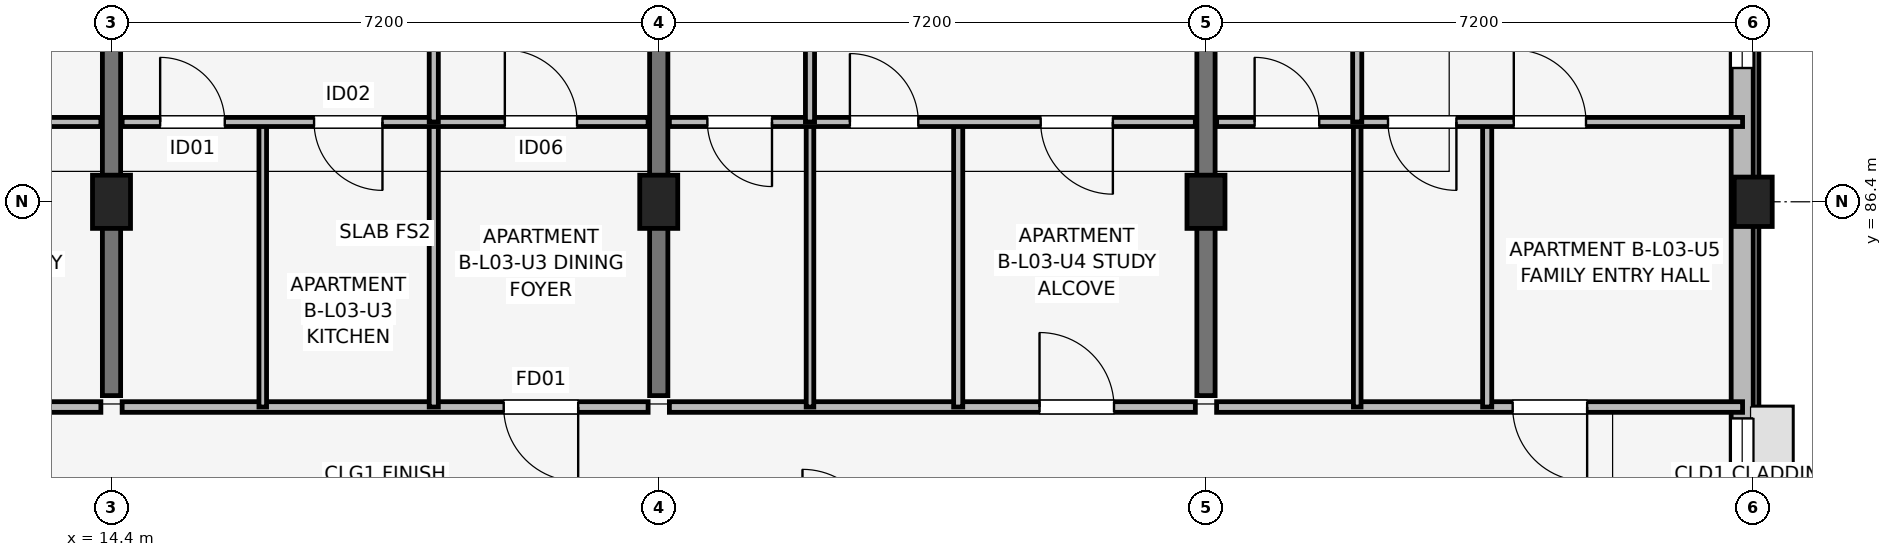
"""IFC4 building model, lengths in metres.
Left out: names, types, materials, properties, quantities, classifications, styles, units other than length and angle.
Written with IfcOpenShell. Run it as: python <this file> out.ifc"""

import sys

from ifc_helpers import new_model, si_unit, direction, frame, frame_2d, origin, origin_2d, place, context, subcontext, project, spatial, rectangle, extrude, element, fill, save


model = new_model("IFC4")
c1 = context("Model", 3, precision=1e-05, world=origin(), true_north=direction((0.0, 1.0)))
c2 = subcontext(c1, "Body", "Model", "MODEL_VIEW")
j1 = project(units=[si_unit("LENGTHUNIT", "METRE"), si_unit("PLANEANGLEUNIT", "RADIAN")], contexts=[c1])
p1 = place(None, origin())
s1 = spatial("IfcSite", under=j1, at=p1, CompositionType="ELEMENT")
p2 = place(p1, origin())
s2 = spatial("IfcBuilding", under=s1, at=p2, CompositionType="ELEMENT")
p3 = place(p2, frame((0.0, 0.0, 11.85)))
s3 = spatial("IfcBuildingStorey", under=s2, at=p3, CompositionType="ELEMENT", Elevation=11.85)
for number, where, z_axis, x_axis in (
    (1, (14.4, 86.4, 0.0), (0.0, 0.0, 1.0), (1.0, 0.0, 0.0)),
    (2, (21.6, 86.4, 0.0), (0.0, 0.0, 1.0), (1.0, 0.0, 0.0)),
    (3, (28.8, 86.4, 0.0), (0.0, 0.0, 1.0), (1.0, 0.0, 0.0)),
):
    element("IfcColumn", number, at=place(p3, frame(where, z_axis=z_axis, x_axis=x_axis)), inside=s3, PredefinedType="COLUMN", context=c2, shape_type="SweptSolid", body=[
        extrude(rectangle(XDim=0.5, YDim=0.7, at=origin_2d()), origin(), (0.0, 0.0, 1.0), 3.15),
    ])
p4 = place(p3, frame((36.0, 86.4, 0.0), z_axis=(0.0, 0.0, 1.0), x_axis=(1.0, 0.0, 0.0)))
e4 = element("IfcColumn", 4, at=p4, inside=s3, PredefinedType="COLUMN", context=c2, shape_type="SweptSolid", body=[
    extrude(rectangle(XDim=0.5, YDim=0.65, at=origin_2d()), origin(), (0.0, 0.0, 1.0), 3.15),
])
for number, where, z_axis, x_axis in (
    (5, (14.4, 83.85, 0.0), (0.0, 0.0, 1.0), (0.0, 1.0, 0.0)),
    (6, (21.6, 83.85, 0.0), (0.0, 0.0, 1.0), (0.0, 1.0, 0.0)),
    (7, (28.8, 83.85, 0.0), (0.0, 0.0, 1.0), (0.0, 1.0, 0.0)),
):
    element("IfcWall", number, at=place(p3, frame(where, z_axis=z_axis, x_axis=x_axis)), inside=s3, PredefinedType="SHEAR", context=c2, shape_type="SweptSolid", body=[
        extrude(rectangle(XDim=9.4, YDim=0.24, at=frame_2d((4.7, 0.0))), origin(), (0.0, 0.0, 1.0), 3.15),
    ])
p5 = place(p3, frame((35.855, 75.2, 0.0), z_axis=(0.0, 0.0, 1.0), x_axis=(0.0, 1.0, 0.0)))
e8 = element("IfcWall", 8, at=p5, inside=s3, PredefinedType="SOLIDWALL", context=c2, shape_type="SweptSolid", body=[
    extrude(rectangle(XDim=15.2, YDim=0.29, at=frame_2d((7.6, 0.0))), origin(), (0.0, 0.0, 1.0), 2.38),
])
p6 = place(p5, frame((6.85, 0.0, 1.05)))
e9 = element("IfcOpeningElement", 9, at=p6, cuts=e8, PredefinedType="OPENING", context=c2, shape_type="SweptSolid", body=[
    extrude(rectangle(XDim=1.5, YDim=1.15, at=frame_2d((0.75, 0.575))), frame((0.0, 0.155, 0.0), z_axis=(0.0, -1.0, 0.0), x_axis=(1.0, 0.0, 0.0)), (0.0, 0.0, 1.0), 0.31),
])
p7 = place(p5, frame((12.96, 0.0, 0.72)))
e10 = element("IfcOpeningElement", 10, at=p7, cuts=e8, PredefinedType="OPENING", context=c2, shape_type="SweptSolid", body=[
    extrude(rectangle(XDim=1.3, YDim=1.55, at=frame_2d((0.65, 0.775))), frame((0.0, 0.155, 0.0), z_axis=(0.0, -1.0, 0.0), x_axis=(1.0, 0.0, 0.0)), (0.0, 0.0, 1.0), 0.31),
])
p8 = place(p3, frame((7.34, 83.7, 0.0), z_axis=(0.0, 0.0, 1.0), x_axis=(1.0, 0.0, 0.0)))
e11 = element("IfcWall", 11, at=p8, inside=s3, PredefinedType="PARTITIONING", context=c2, shape_type="SweptSolid", body=[
    extrude(rectangle(XDim=6.92, YDim=0.14, at=frame_2d((3.46, 0.0))), origin(), (0.0, 0.0, 1.0), 2.38),
])
p9 = place(p8, frame((5.85, 0.0, 0.0), z_axis=(0.0, 0.0, 1.0), x_axis=(-1.0, 0.0, 0.0)))
e12 = element("IfcOpeningElement", 12, at=p9, cuts=e11, PredefinedType="OPENING", context=c2, shape_type="SweptSolid", body=[
    extrude(rectangle(XDim=0.98, YDim=2.1, at=frame_2d((0.49, 1.05))), frame((0.0, 0.08, 0.0), z_axis=(0.0, -1.0, 0.0), x_axis=(1.0, 0.0, 0.0)), (0.0, 0.0, 1.0), 0.16),
])
p10 = place(p3, frame((7.34, 87.45, 0.0), z_axis=(0.0, 0.0, 1.0), x_axis=(1.0, 0.0, 0.0)))
e13 = element("IfcWall", 13, at=p10, inside=s3, PredefinedType="PARTITIONING", context=c2, shape_type="SweptSolid", body=[
    extrude(rectangle(XDim=6.92, YDim=0.12, at=frame_2d((3.46, 0.0))), origin(), (0.0, 0.0, 1.0), 2.38),
])
p11 = place(p10, frame((0.5, 0.0, 0.0)))
e14 = element("IfcOpeningElement", 14, at=p11, cuts=e13, PredefinedType="OPENING", context=c2, shape_type="SweptSolid", body=[
    extrude(rectangle(XDim=0.85, YDim=2.08, at=frame_2d((0.425, 1.04))), frame((0.0, 0.07, 0.0), z_axis=(0.0, -1.0, 0.0), x_axis=(1.0, 0.0, 0.0)), (0.0, 0.0, 1.0), 0.14),
])
p12 = place(p10, frame((3.275, 0.0, 0.0), z_axis=(0.0, 0.0, 1.0), x_axis=(-1.0, 0.0, 0.0)))
e15 = element("IfcOpeningElement", 15, at=p12, cuts=e13, PredefinedType="OPENING", context=c2, shape_type="SweptSolid", body=[
    extrude(rectangle(XDim=0.9, YDim=2.08, at=frame_2d((0.45, 1.04))), frame((0.0, 0.07, 0.0), z_axis=(0.0, -1.0, 0.0), x_axis=(1.0, 0.0, 0.0)), (0.0, 0.0, 1.0), 0.14),
])
p13 = place(p10, frame((4.885, 0.0, 0.0)))
e16 = element("IfcOpeningElement", 16, at=p13, cuts=e13, PredefinedType="OPENING", context=c2, shape_type="SweptSolid", body=[
    extrude(rectangle(XDim=0.95, YDim=2.08, at=frame_2d((0.475, 1.04))), frame((0.0, 0.07, 0.0), z_axis=(0.0, -1.0, 0.0), x_axis=(1.0, 0.0, 0.0)), (0.0, 0.0, 1.0), 0.14),
])
p14 = place(p3, frame((14.54, 83.7, 0.0), z_axis=(0.0, 0.0, 1.0), x_axis=(1.0, 0.0, 0.0)))
e17 = element("IfcWall", 17, at=p14, inside=s3, PredefinedType="PARTITIONING", context=c2, shape_type="SweptSolid", body=[
    extrude(rectangle(XDim=6.92, YDim=0.14, at=frame_2d((3.46, 0.0))), origin(), (0.0, 0.0, 1.0), 2.38),
])
p15 = place(p14, frame((6.0, 0.0, 0.0), z_axis=(0.0, 0.0, 1.0), x_axis=(-1.0, 0.0, 0.0)))
e18 = element("IfcOpeningElement", 18, at=p15, cuts=e17, PredefinedType="OPENING", context=c2, shape_type="SweptSolid", body=[
    extrude(rectangle(XDim=0.98, YDim=2.1, at=frame_2d((0.49, 1.05))), frame((0.0, 0.08, 0.0), z_axis=(0.0, -1.0, 0.0), x_axis=(1.0, 0.0, 0.0)), (0.0, 0.0, 1.0), 0.16),
])
p16 = place(p3, frame((16.39, 83.7, 0.0), z_axis=(0.0, 0.0, 1.0), x_axis=(0.0, 1.0, 0.0)))
e19 = element("IfcWall", 19, at=p16, inside=s3, PredefinedType="PARTITIONING", context=c2, shape_type="SweptSolid", body=[
    extrude(rectangle(XDim=3.75, YDim=0.1, at=frame_2d((1.875, 0.0))), origin(), (0.0, 0.0, 1.0), 2.375),
])
p17 = place(p3, frame((18.64, 83.7, 0.0), z_axis=(0.0, 0.0, 1.0), x_axis=(0.0, 1.0, 0.0)))
e20 = element("IfcWall", 20, at=p17, inside=s3, PredefinedType="PARTITIONING", context=c2, shape_type="SweptSolid", body=[
    extrude(rectangle(XDim=3.75, YDim=0.12, at=frame_2d((1.875, 0.0))), origin(), (0.0, 0.0, 1.0), 2.375),
])
p18 = place(p3, frame((14.54, 87.45, 0.0), z_axis=(0.0, 0.0, 1.0), x_axis=(1.0, 0.0, 0.0)))
e21 = element("IfcWall", 21, at=p18, inside=s3, PredefinedType="PARTITIONING", context=c2, shape_type="SweptSolid", body=[
    extrude(rectangle(XDim=6.92, YDim=0.12, at=frame_2d((3.46, 0.0))), origin(), (0.0, 0.0, 1.0), 2.38),
])
p19 = place(p18, frame((0.5, 0.0, 0.0)))
e22 = element("IfcOpeningElement", 22, at=p19, cuts=e21, PredefinedType="OPENING", context=c2, shape_type="SweptSolid", body=[
    extrude(rectangle(XDim=0.85, YDim=2.08, at=frame_2d((0.425, 1.04))), frame((0.0, 0.07, 0.0), z_axis=(0.0, -1.0, 0.0), x_axis=(1.0, 0.0, 0.0)), (0.0, 0.0, 1.0), 0.14),
])
p20 = place(p18, frame((3.425, 0.0, 0.0), z_axis=(0.0, 0.0, 1.0), x_axis=(-1.0, 0.0, 0.0)))
e23 = element("IfcOpeningElement", 23, at=p20, cuts=e21, PredefinedType="OPENING", context=c2, shape_type="SweptSolid", body=[
    extrude(rectangle(XDim=0.9, YDim=2.08, at=frame_2d((0.45, 1.04))), frame((0.0, 0.07, 0.0), z_axis=(0.0, -1.0, 0.0), x_axis=(1.0, 0.0, 0.0)), (0.0, 0.0, 1.0), 0.14),
])
p21 = place(p18, frame((5.035, 0.0, 0.0)))
e24 = element("IfcOpeningElement", 24, at=p21, cuts=e21, PredefinedType="OPENING", context=c2, shape_type="SweptSolid", body=[
    extrude(rectangle(XDim=0.95, YDim=2.08, at=frame_2d((0.475, 1.04))), frame((0.0, 0.07, 0.0), z_axis=(0.0, -1.0, 0.0), x_axis=(1.0, 0.0, 0.0)), (0.0, 0.0, 1.0), 0.14),
])
p22 = place(p3, frame((18.64, 87.45, 0.0), z_axis=(0.0, 0.0, 1.0), x_axis=(0.0, 1.0, 0.0)))
e25 = element("IfcWall", 25, at=p22, inside=s3, PredefinedType="PARTITIONING", context=c2, shape_type="SweptSolid", body=[
    extrude(rectangle(XDim=5.85, YDim=0.12, at=frame_2d((2.925, 0.0))), origin(), (0.0, 0.0, 1.0), 2.38),
])
p23 = place(p22, frame((3.375, 0.0, 0.0), z_axis=(0.0, 0.0, 1.0), x_axis=(-1.0, 0.0, 0.0)))
e26 = element("IfcOpeningElement", 26, at=p23, cuts=e25, PredefinedType="OPENING", context=c2, shape_type="SweptSolid", body=[
    extrude(rectangle(XDim=0.9, YDim=2.08, at=frame_2d((0.45, 1.04))), frame((0.0, 0.07, 0.0), z_axis=(0.0, -1.0, 0.0), x_axis=(1.0, 0.0, 0.0)), (0.0, 0.0, 1.0), 0.14),
])
p24 = place(p3, frame((21.74, 83.7, 0.0), z_axis=(0.0, 0.0, 1.0), x_axis=(1.0, 0.0, 0.0)))
e27 = element("IfcWall", 27, at=p24, inside=s3, PredefinedType="PARTITIONING", context=c2, shape_type="SweptSolid", body=[
    extrude(rectangle(XDim=6.92, YDim=0.14, at=frame_2d((3.46, 0.0))), origin(), (0.0, 0.0, 1.0), 2.38),
])
p25 = place(p24, frame((4.87, 0.0, 0.0)))
e28 = element("IfcOpeningElement", 28, at=p25, cuts=e27, PredefinedType="OPENING", context=c2, shape_type="SweptSolid", body=[
    extrude(rectangle(XDim=0.98, YDim=2.1, at=frame_2d((0.49, 1.05))), frame((0.0, 0.08, 0.0), z_axis=(0.0, -1.0, 0.0), x_axis=(1.0, 0.0, 0.0)), (0.0, 0.0, 1.0), 0.16),
])
p26 = place(p3, frame((23.59, 83.7, 0.0), z_axis=(0.0, 0.0, 1.0), x_axis=(0.0, 1.0, 0.0)))
e29 = element("IfcWall", 29, at=p26, inside=s3, PredefinedType="PARTITIONING", context=c2, shape_type="SweptSolid", body=[
    extrude(rectangle(XDim=3.75, YDim=0.1, at=frame_2d((1.875, 0.0))), origin(), (0.0, 0.0, 1.0), 2.375),
])
p27 = place(p3, frame((25.54, 83.7, 0.0), z_axis=(0.0, 0.0, 1.0), x_axis=(0.0, 1.0, 0.0)))
e30 = element("IfcWall", 30, at=p27, inside=s3, PredefinedType="PARTITIONING", context=c2, shape_type="SweptSolid", body=[
    extrude(rectangle(XDim=3.75, YDim=0.12, at=frame_2d((1.875, 0.0))), origin(), (0.0, 0.0, 1.0), 2.375),
])
p28 = place(p3, frame((21.74, 87.45, 0.0), z_axis=(0.0, 0.0, 1.0), x_axis=(1.0, 0.0, 0.0)))
e31 = element("IfcWall", 31, at=p28, inside=s3, PredefinedType="PARTITIONING", context=c2, shape_type="SweptSolid", body=[
    extrude(rectangle(XDim=6.92, YDim=0.12, at=frame_2d((3.46, 0.0))), origin(), (0.0, 0.0, 1.0), 2.38),
])
p29 = place(p28, frame((1.35, 0.0, 0.0), z_axis=(0.0, 0.0, 1.0), x_axis=(-1.0, 0.0, 0.0)))
e32 = element("IfcOpeningElement", 32, at=p29, cuts=e31, PredefinedType="OPENING", context=c2, shape_type="SweptSolid", body=[
    extrude(rectangle(XDim=0.85, YDim=2.08, at=frame_2d((0.425, 1.04))), frame((0.0, 0.07, 0.0), z_axis=(0.0, -1.0, 0.0), x_axis=(1.0, 0.0, 0.0)), (0.0, 0.0, 1.0), 0.14),
])
p30 = place(p28, frame((2.375, 0.0, 0.0)))
e33 = element("IfcOpeningElement", 33, at=p30, cuts=e31, PredefinedType="OPENING", context=c2, shape_type="SweptSolid", body=[
    extrude(rectangle(XDim=0.9, YDim=2.08, at=frame_2d((0.45, 1.04))), frame((0.0, 0.07, 0.0), z_axis=(0.0, -1.0, 0.0), x_axis=(1.0, 0.0, 0.0)), (0.0, 0.0, 1.0), 0.14),
])
p31 = place(p28, frame((5.835, 0.0, 0.0), z_axis=(0.0, 0.0, 1.0), x_axis=(-1.0, 0.0, 0.0)))
e34 = element("IfcOpeningElement", 34, at=p31, cuts=e31, PredefinedType="OPENING", context=c2, shape_type="SweptSolid", body=[
    extrude(rectangle(XDim=0.95, YDim=2.08, at=frame_2d((0.475, 1.04))), frame((0.0, 0.07, 0.0), z_axis=(0.0, -1.0, 0.0), x_axis=(1.0, 0.0, 0.0)), (0.0, 0.0, 1.0), 0.14),
])
p32 = place(p3, frame((23.59, 87.45, 0.0), z_axis=(0.0, 0.0, 1.0), x_axis=(0.0, 1.0, 0.0)))
e35 = element("IfcWall", 35, at=p32, inside=s3, PredefinedType="PARTITIONING", context=c2, shape_type="SweptSolid", body=[
    extrude(rectangle(XDim=5.85, YDim=0.12, at=frame_2d((2.925, 0.0))), origin(), (0.0, 0.0, 1.0), 2.38),
])
p33 = place(p32, frame((2.475, 0.0, 0.0)))
e36 = element("IfcOpeningElement", 36, at=p33, cuts=e35, PredefinedType="OPENING", context=c2, shape_type="SweptSolid", body=[
    extrude(rectangle(XDim=0.9, YDim=2.08, at=frame_2d((0.45, 1.04))), frame((0.0, 0.07, 0.0), z_axis=(0.0, -1.0, 0.0), x_axis=(1.0, 0.0, 0.0)), (0.0, 0.0, 1.0), 0.14),
])
p34 = place(p3, frame((28.94, 83.7, 0.0), z_axis=(0.0, 0.0, 1.0), x_axis=(1.0, 0.0, 0.0)))
e37 = element("IfcWall", 37, at=p34, inside=s3, PredefinedType="PARTITIONING", context=c2, shape_type="SweptSolid", body=[
    extrude(rectangle(XDim=6.92, YDim=0.14, at=frame_2d((3.46, 0.0))), origin(), (0.0, 0.0, 1.0), 2.38),
])
p35 = place(p34, frame((4.875, 0.0, 0.0), z_axis=(0.0, 0.0, 1.0), x_axis=(-1.0, 0.0, 0.0)))
e38 = element("IfcOpeningElement", 38, at=p35, cuts=e37, PredefinedType="OPENING", context=c2, shape_type="SweptSolid", body=[
    extrude(rectangle(XDim=0.98, YDim=2.1, at=frame_2d((0.49, 1.05))), frame((0.0, 0.08, 0.0), z_axis=(0.0, -1.0, 0.0), x_axis=(1.0, 0.0, 0.0)), (0.0, 0.0, 1.0), 0.16),
])
p36 = place(p3, frame((30.79, 83.7, 0.0), z_axis=(0.0, 0.0, 1.0), x_axis=(0.0, 1.0, 0.0)))
e39 = element("IfcWall", 39, at=p36, inside=s3, PredefinedType="PARTITIONING", context=c2, shape_type="SweptSolid", body=[
    extrude(rectangle(XDim=3.75, YDim=0.1, at=frame_2d((1.875, 0.0))), origin(), (0.0, 0.0, 1.0), 2.375),
])
p37 = place(p3, frame((32.5, 83.7, 0.0), z_axis=(0.0, 0.0, 1.0), x_axis=(0.0, 1.0, 0.0)))
e40 = element("IfcWall", 40, at=p37, inside=s3, PredefinedType="PARTITIONING", context=c2, shape_type="SweptSolid", body=[
    extrude(rectangle(XDim=3.75, YDim=0.12, at=frame_2d((1.875, 0.0))), origin(), (0.0, 0.0, 1.0), 2.375),
])
p38 = place(p3, frame((28.94, 87.45, 0.0), z_axis=(0.0, 0.0, 1.0), x_axis=(1.0, 0.0, 0.0)))
e41 = element("IfcWall", 41, at=p38, inside=s3, PredefinedType="PARTITIONING", context=c2, shape_type="SweptSolid", body=[
    extrude(rectangle(XDim=6.92, YDim=0.12, at=frame_2d((3.46, 0.0))), origin(), (0.0, 0.0, 1.0), 2.38),
])
p39 = place(p38, frame((0.5, 0.0, 0.0)))
e42 = element("IfcOpeningElement", 42, at=p39, cuts=e41, PredefinedType="OPENING", context=c2, shape_type="SweptSolid", body=[
    extrude(rectangle(XDim=0.85, YDim=2.08, at=frame_2d((0.425, 1.04))), frame((0.0, 0.07, 0.0), z_axis=(0.0, -1.0, 0.0), x_axis=(1.0, 0.0, 0.0)), (0.0, 0.0, 1.0), 0.14),
])
p40 = place(p38, frame((3.155, 0.0, 0.0), z_axis=(0.0, 0.0, 1.0), x_axis=(-1.0, 0.0, 0.0)))
e43 = element("IfcOpeningElement", 43, at=p40, cuts=e41, PredefinedType="OPENING", context=c2, shape_type="SweptSolid", body=[
    extrude(rectangle(XDim=0.9, YDim=2.08, at=frame_2d((0.45, 1.04))), frame((0.0, 0.07, 0.0), z_axis=(0.0, -1.0, 0.0), x_axis=(1.0, 0.0, 0.0)), (0.0, 0.0, 1.0), 0.14),
])
p41 = place(p38, frame((3.91, 0.0, 0.0)))
e44 = element("IfcOpeningElement", 44, at=p41, cuts=e41, PredefinedType="OPENING", context=c2, shape_type="SweptSolid", body=[
    extrude(rectangle(XDim=0.95, YDim=2.08, at=frame_2d((0.475, 1.04))), frame((0.0, 0.07, 0.0), z_axis=(0.0, -1.0, 0.0), x_axis=(1.0, 0.0, 0.0)), (0.0, 0.0, 1.0), 0.14),
])
p42 = place(p3, frame((30.79, 87.45, 0.0), z_axis=(0.0, 0.0, 1.0), x_axis=(0.0, 1.0, 0.0)))
e45 = element("IfcWall", 45, at=p42, inside=s3, PredefinedType="PARTITIONING", context=c2, shape_type="SweptSolid", body=[
    extrude(rectangle(XDim=5.85, YDim=0.12, at=frame_2d((2.925, 0.0))), origin(), (0.0, 0.0, 1.0), 2.38),
])
p43 = place(p42, frame((3.375, 0.0, 0.0), z_axis=(0.0, 0.0, 1.0), x_axis=(-1.0, 0.0, 0.0)))
e46 = element("IfcOpeningElement", 46, at=p43, cuts=e45, PredefinedType="OPENING", context=c2, shape_type="SweptSolid", body=[
    extrude(rectangle(XDim=0.9, YDim=2.08, at=frame_2d((0.45, 1.04))), frame((0.0, 0.07, 0.0), z_axis=(0.0, -1.0, 0.0), x_axis=(1.0, 0.0, 0.0)), (0.0, 0.0, 1.0), 0.14),
])
p44 = place(p6, origin())
e47 = element("IfcWindow", 47, at=p44, inside=s3, PartitioningType="SINGLE_PANEL", PredefinedType="WINDOW", context=c2, shape_type="SweptSolid", body=[
    extrude(rectangle(XDim=1.5, YDim=1.15, at=frame_2d((0.75, 0.575))), frame((0.0, 0.03, 0.0), z_axis=(0.0, -1.0, 0.0), x_axis=(1.0, 0.0, 0.0)), (0.0, 0.0, 1.0), 0.06),
])
fill(e9, e47)
p45 = place(p7, origin())
e48 = element("IfcWindow", 48, at=p45, inside=s3, PartitioningType="SINGLE_PANEL", PredefinedType="WINDOW", context=c2, shape_type="SweptSolid", body=[
    extrude(rectangle(XDim=1.3, YDim=1.55, at=frame_2d((0.65, 0.775))), frame((0.0, 0.03, 0.0), z_axis=(0.0, -1.0, 0.0), x_axis=(1.0, 0.0, 0.0)), (0.0, 0.0, 1.0), 0.06),
])
fill(e10, e48)
p46 = place(p15, origin())
e49 = element("IfcDoor", 49, at=p46, inside=s3, OperationType="SINGLE_SWING_RIGHT", PredefinedType="DOOR", context=c2, shape_type="SweptSolid", body=[
    extrude(rectangle(XDim=0.98, YDim=2.1, at=frame_2d((0.49, 1.05))), frame((0.0, 0.025, 0.0), z_axis=(0.0, -1.0, 0.0), x_axis=(1.0, 0.0, 0.0)), (0.0, 0.0, 1.0), 0.05),
])
fill(e18, e49)
p47 = place(p19, origin())
e50 = element("IfcDoor", 50, at=p47, inside=s3, OperationType="SINGLE_SWING_LEFT", PredefinedType="DOOR", context=c2, shape_type="SweptSolid", body=[
    extrude(rectangle(XDim=0.85, YDim=2.08, at=frame_2d((0.425, 1.04))), frame((0.0, 0.025, 0.0), z_axis=(0.0, -1.0, 0.0), x_axis=(1.0, 0.0, 0.0)), (0.0, 0.0, 1.0), 0.05),
])
fill(e22, e50)
p48 = place(p20, origin())
e51 = element("IfcDoor", 51, at=p48, inside=s3, OperationType="SINGLE_SWING_RIGHT", PredefinedType="DOOR", context=c2, shape_type="SweptSolid", body=[
    extrude(rectangle(XDim=0.9, YDim=2.08, at=frame_2d((0.45, 1.04))), frame((0.0, 0.025, 0.0), z_axis=(0.0, -1.0, 0.0), x_axis=(1.0, 0.0, 0.0)), (0.0, 0.0, 1.0), 0.05),
])
fill(e23, e51)
p49 = place(p21, origin())
e52 = element("IfcDoor", 52, at=p49, inside=s3, OperationType="SINGLE_SWING_LEFT", PredefinedType="DOOR", context=c2, shape_type="SweptSolid", body=[
    extrude(rectangle(XDim=0.95, YDim=2.08, at=frame_2d((0.475, 1.04))), frame((0.0, 0.025, 0.0), z_axis=(0.0, -1.0, 0.0), x_axis=(1.0, 0.0, 0.0)), (0.0, 0.0, 1.0), 0.05),
])
fill(e24, e52)
p50 = place(p25, origin())
e53 = element("IfcDoor", 53, at=p50, inside=s3, OperationType="SINGLE_SWING_LEFT", PredefinedType="DOOR", context=c2, shape_type="SweptSolid", body=[
    extrude(rectangle(XDim=0.98, YDim=2.1, at=frame_2d((0.49, 1.05))), frame((0.0, 0.025, 0.0), z_axis=(0.0, -1.0, 0.0), x_axis=(1.0, 0.0, 0.0)), (0.0, 0.0, 1.0), 0.05),
])
fill(e28, e53)
p51 = place(p29, origin())
e54 = element("IfcDoor", 54, at=p51, inside=s3, OperationType="SINGLE_SWING_RIGHT", PredefinedType="DOOR", context=c2, shape_type="SweptSolid", body=[
    extrude(rectangle(XDim=0.85, YDim=2.08, at=frame_2d((0.425, 1.04))), frame((0.0, 0.025, 0.0), z_axis=(0.0, -1.0, 0.0), x_axis=(1.0, 0.0, 0.0)), (0.0, 0.0, 1.0), 0.05),
])
fill(e32, e54)
p52 = place(p30, origin())
e55 = element("IfcDoor", 55, at=p52, inside=s3, OperationType="SINGLE_SWING_LEFT", PredefinedType="DOOR", context=c2, shape_type="SweptSolid", body=[
    extrude(rectangle(XDim=0.9, YDim=2.08, at=frame_2d((0.45, 1.04))), frame((0.0, 0.025, 0.0), z_axis=(0.0, -1.0, 0.0), x_axis=(1.0, 0.0, 0.0)), (0.0, 0.0, 1.0), 0.05),
])
fill(e33, e55)
p53 = place(p31, origin())
e56 = element("IfcDoor", 56, at=p53, inside=s3, OperationType="SINGLE_SWING_RIGHT", PredefinedType="DOOR", context=c2, shape_type="SweptSolid", body=[
    extrude(rectangle(XDim=0.95, YDim=2.08, at=frame_2d((0.475, 1.04))), frame((0.0, 0.025, 0.0), z_axis=(0.0, -1.0, 0.0), x_axis=(1.0, 0.0, 0.0)), (0.0, 0.0, 1.0), 0.05),
])
fill(e34, e56)
p54 = place(p35, origin())
e57 = element("IfcDoor", 57, at=p54, inside=s3, OperationType="SINGLE_SWING_RIGHT", PredefinedType="DOOR", context=c2, shape_type="SweptSolid", body=[
    extrude(rectangle(XDim=0.98, YDim=2.1, at=frame_2d((0.49, 1.05))), frame((0.0, 0.025, 0.0), z_axis=(0.0, -1.0, 0.0), x_axis=(1.0, 0.0, 0.0)), (0.0, 0.0, 1.0), 0.05),
])
fill(e38, e57)
p55 = place(p39, origin())
e58 = element("IfcDoor", 58, at=p55, inside=s3, OperationType="SINGLE_SWING_LEFT", PredefinedType="DOOR", context=c2, shape_type="SweptSolid", body=[
    extrude(rectangle(XDim=0.85, YDim=2.08, at=frame_2d((0.425, 1.04))), frame((0.0, 0.025, 0.0), z_axis=(0.0, -1.0, 0.0), x_axis=(1.0, 0.0, 0.0)), (0.0, 0.0, 1.0), 0.05),
])
fill(e42, e58)
p56 = place(p40, origin())
e59 = element("IfcDoor", 59, at=p56, inside=s3, OperationType="SINGLE_SWING_RIGHT", PredefinedType="DOOR", context=c2, shape_type="SweptSolid", body=[
    extrude(rectangle(XDim=0.9, YDim=2.08, at=frame_2d((0.45, 1.04))), frame((0.0, 0.025, 0.0), z_axis=(0.0, -1.0, 0.0), x_axis=(1.0, 0.0, 0.0)), (0.0, 0.0, 1.0), 0.05),
])
fill(e43, e59)
p57 = place(p41, origin())
e60 = element("IfcDoor", 60, at=p57, inside=s3, OperationType="SINGLE_SWING_LEFT", PredefinedType="DOOR", context=c2, shape_type="SweptSolid", body=[
    extrude(rectangle(XDim=0.95, YDim=2.08, at=frame_2d((0.475, 1.04))), frame((0.0, 0.025, 0.0), z_axis=(0.0, -1.0, 0.0), x_axis=(1.0, 0.0, 0.0)), (0.0, 0.0, 1.0), 0.05),
])
fill(e44, e60)
save(model, sys.argv[1])
